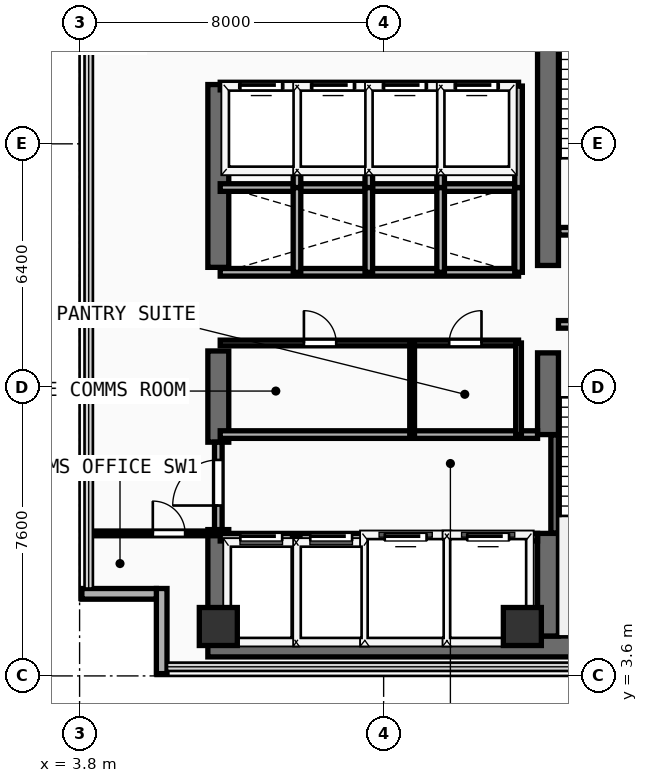
"""IFC4 building model, lengths in metres.
Left out: names, types, materials, properties, quantities, classifications, styles, units other than length and angle.
Written with IfcOpenShell. Run it as: python <this file> out.ifc"""

import sys

from ifc_helpers import new_model, si_unit, direction, frame, frame_2d, origin, origin_2d, place, context, subcontext, project, spatial, rectangle, extrude, element, fill, save


model = new_model("IFC4")
c1 = context("Model", 3, precision=1e-05, world=origin(), true_north=direction((0.0, 1.0)))
c2 = subcontext(c1, "Body", "Model", "MODEL_VIEW")
j1 = project(units=[si_unit("LENGTHUNIT", "METRE"), si_unit("PLANEANGLEUNIT", "RADIAN")], contexts=[c1])
p1 = place(None, origin())
s1 = spatial("IfcSite", under=j1, at=p1, CompositionType="ELEMENT")
p2 = place(p1, origin())
s2 = spatial("IfcBuilding", under=s1, at=p2, CompositionType="ELEMENT")
p3 = place(p2, frame((0.0, 0.0, 227.3)))
s3 = spatial("IfcBuildingStorey", under=s2, at=p3, CompositionType="ELEMENT", Elevation=227.3)
p4 = place(p3, frame((7.175, 4.375, 0.0), z_axis=(0.0, 0.0, 1.0), x_axis=(1.0, 0.0, 0.0)))
e1 = element("IfcWall", 1, at=p4, inside=s3, PredefinedType="SHEAR", context=c2, shape_type="SweptSolid", body=[
    extrude(rectangle(XDim=13.9, YDim=0.55, at=frame_2d((6.95, 0.0))), origin(), (0.0, 0.0, 1.0), 3.56),
])
p5 = place(p3, frame((7.45, 4.65, 0.0), z_axis=(0.0, 0.0, 1.0), x_axis=(0.0, 1.0, 0.0)))
e2 = element("IfcWall", 2, at=p5, inside=s3, PredefinedType="SHEAR", context=c2, shape_type="SweptSolid", body=[
    extrude(rectangle(XDim=2.8, YDim=0.55, at=frame_2d((1.4, 0.0))), origin(), (0.0, 0.0, 1.0), 3.56),
])
p6 = place(p3, frame((7.45, 9.75, 0.0), z_axis=(0.0, 0.0, 1.0), x_axis=(0.0, 1.0, 0.0)))
e3 = element("IfcWall", 3, at=p6, inside=s3, PredefinedType="SHEAR", context=c2, shape_type="SweptSolid", body=[
    extrude(rectangle(XDim=2.4, YDim=0.55, at=frame_2d((1.2, 0.0))), origin(), (0.0, 0.0, 1.0), 3.56),
])
p7 = place(p3, frame((7.45, 14.35, 0.0), z_axis=(0.0, 0.0, 1.0), x_axis=(0.0, 1.0, 0.0)))
e4 = element("IfcWall", 4, at=p7, inside=s3, PredefinedType="SHEAR", context=c2, shape_type="SweptSolid", body=[
    extrude(rectangle(XDim=4.81, YDim=0.55, at=frame_2d((2.405, 0.0))), origin(), (0.0, 0.0, 1.0), 3.56),
])
p8 = place(p3, frame((16.125, 4.65, 0.0), z_axis=(0.0, 0.0, 1.0), x_axis=(0.0, 1.0, 0.0)))
e5 = element("IfcWall", 5, at=p8, inside=s3, PredefinedType="SHEAR", context=c2, shape_type="SweptSolid", body=[
    extrude(rectangle(XDim=2.7, YDim=0.55, at=frame_2d((1.35, 0.0))), origin(), (0.0, 0.0, 1.0), 3.56),
])
p9 = place(p3, frame((16.125, 9.95, 0.0), z_axis=(0.0, 0.0, 1.0), x_axis=(0.0, 1.0, 0.0)))
e6 = element("IfcWall", 6, at=p9, inside=s3, PredefinedType="SHEAR", context=c2, shape_type="SweptSolid", body=[
    extrude(rectangle(XDim=2.15, YDim=0.55, at=frame_2d((1.075, 0.0))), origin(), (0.0, 0.0, 1.0), 3.56),
])
p10 = place(p3, frame((16.125, 14.4, 0.0), z_axis=(0.0, 0.0, 1.0), x_axis=(0.0, 1.0, 0.0)))
e7 = element("IfcWall", 7, at=p10, inside=s3, PredefinedType="SHEAR", context=c2, shape_type="SweptSolid", body=[
    extrude(rectangle(XDim=9.1, YDim=0.55, at=frame_2d((4.55, 0.0))), origin(), (0.0, 0.0, 1.0), 3.56),
])
for number, where, z_axis, x_axis in (
    (8, (7.45, 4.9, 0.0), (0.0, 0.0, 1.0), (1.0, 0.0, 0.0)),
    (9, (15.45, 4.9, 0.0), (0.0, 0.0, 1.0), (1.0, 0.0, 0.0)),
):
    element("IfcColumn", number, at=place(p3, frame(where, z_axis=z_axis, x_axis=x_axis)), inside=s3, PredefinedType="COLUMN", context=c2, shape_type="SweptSolid", body=[
        extrude(rectangle(XDim=1.0, YDim=1.0, at=origin_2d()), origin(), (0.0, 0.0, 1.0), 3.56),
    ])
p11 = place(p3, frame((5.96, 3.66, 0.0), z_axis=(0.0, 0.0, 1.0), x_axis=(0.0, 1.0, 0.0)))
e10 = element("IfcWall", 10, at=p11, inside=s3, PredefinedType="SOLIDWALL", context=c2, shape_type="SweptSolid", body=[
    extrude(rectangle(XDim=2.24, YDim=0.28, at=frame_2d((1.12, 0.0))), origin(), (0.0, 0.0, 1.0), 3.56),
])
p12 = place(p3, frame((3.86, 5.76, 0.0), z_axis=(0.0, 0.0, 1.0), x_axis=(1.0, 0.0, 0.0)))
e11 = element("IfcWall", 11, at=p12, inside=s3, PredefinedType="SOLIDWALL", context=c2, shape_type="SweptSolid", body=[
    extrude(rectangle(XDim=1.96, YDim=0.28, at=frame_2d((0.98, 0.0))), origin(), (0.0, 0.0, 1.0), 3.56),
])
p13 = place(p3, frame((16.3, 7.36, 0.0), z_axis=(0.0, 0.0, 1.0), x_axis=(0.0, 1.0, 0.0)))
e12 = element("IfcWall", 12, at=p13, inside=s3, PredefinedType="SHEAR", context=c2, shape_type="SweptSolid", body=[
    extrude(rectangle(XDim=2.58, YDim=0.2, at=frame_2d((1.29, 0.0))), origin(), (0.0, 0.0, 1.0), 3.56),
])
p14 = place(p3, frame((16.4, 12.85, 0.0), z_axis=(0.0, 0.0, 1.0), x_axis=(1.0, 0.0, 0.0)))
e13 = element("IfcWall", 13, at=p14, inside=s3, PredefinedType="PARTITIONING", context=c2, shape_type="SweptSolid", body=[
    extrude(rectangle(XDim=3.96, YDim=0.2, at=frame_2d((1.98, 0.0))), origin(), (0.0, 0.0, 1.0), 3.56),
])
p15 = place(p14, frame((1.304, 0.0, 0.0)))
e14 = element("IfcOpeningElement", 14, at=p15, cuts=e13, PredefinedType="OPENING", context=c2, shape_type="SweptSolid", body=[
    extrude(rectangle(XDim=1.1, YDim=2.2, at=frame_2d((0.55, 1.1))), frame((0.0, 0.11, 0.0), z_axis=(0.0, -1.0, 0.0), x_axis=(1.0, 0.0, 0.0)), (0.0, 0.0, 1.0), 0.22),
])
p16 = place(p3, frame((16.41, 15.3, 0.0), z_axis=(0.0, 0.0, 1.0), x_axis=(1.0, 0.0, 0.0)))
e15 = element("IfcWall", 15, at=p16, inside=s3, PredefinedType="PARTITIONING", context=c2, shape_type="SweptSolid", body=[
    extrude(rectangle(XDim=3.95, YDim=0.2, at=frame_2d((1.975, 0.0))), origin(), (0.0, 0.0, 1.0), 3.56),
])
p17 = place(p16, frame((1.294, 0.0, 0.0)))
e16 = element("IfcOpeningElement", 16, at=p17, cuts=e15, PredefinedType="OPENING", context=c2, shape_type="SweptSolid", body=[
    extrude(rectangle(XDim=1.1, YDim=2.2, at=frame_2d((0.55, 1.1))), frame((0.0, 0.11, 0.0), z_axis=(0.0, -1.0, 0.0), x_axis=(1.0, 0.0, 0.0)), (0.0, 0.0, 1.0), 0.22),
])
p18 = place(p3, frame((7.5, 7.25, 0.0), z_axis=(0.0, 0.0, 1.0), x_axis=(1.0, 0.0, 0.0)))
e17 = element("IfcWall", 17, at=p18, inside=s3, PredefinedType="PARTITIONING", context=c2, shape_type="SweptSolid", body=[
    extrude(rectangle(XDim=8.35, YDim=0.2, at=frame_2d((4.175, 0.0))), origin(), (0.0, 0.0, 1.0), 3.56),
])
p19 = place(p18, frame((0.53, 0.0, 0.0)))
e18 = element("IfcOpeningElement", 18, at=p19, cuts=e17, PredefinedType="OPENING", context=c2, shape_type="SweptSolid", body=[
    extrude(rectangle(XDim=1.1, YDim=2.2, at=frame_2d((0.55, 1.1))), frame((0.0, 0.11, 0.0), z_axis=(0.0, -1.0, 0.0), x_axis=(1.0, 0.0, 0.0)), (0.0, 0.0, 1.0), 0.22),
])
p20 = place(p18, frame((2.37, 0.0, 0.0)))
e19 = element("IfcOpeningElement", 19, at=p20, cuts=e17, PredefinedType="OPENING", context=c2, shape_type="SweptSolid", body=[
    extrude(rectangle(XDim=1.1, YDim=2.2, at=frame_2d((0.55, 1.1))), frame((0.0, 0.11, 0.0), z_axis=(0.0, -1.0, 0.0), x_axis=(1.0, 0.0, 0.0)), (0.0, 0.0, 1.0), 0.22),
])
p21 = place(p18, frame((4.33, 0.0, 0.0)))
e20 = element("IfcOpeningElement", 20, at=p21, cuts=e17, PredefinedType="OPENING", context=c2, shape_type="SweptSolid", body=[
    extrude(rectangle(XDim=1.1, YDim=2.2, at=frame_2d((0.55, 1.1))), frame((0.0, 0.11, 0.0), z_axis=(0.0, -1.0, 0.0), x_axis=(1.0, 0.0, 0.0)), (0.0, 0.0, 1.0), 0.22),
])
p22 = place(p18, frame((6.5, 0.0, 0.0)))
e21 = element("IfcOpeningElement", 21, at=p22, cuts=e17, PredefinedType="OPENING", context=c2, shape_type="SweptSolid", body=[
    extrude(rectangle(XDim=1.1, YDim=2.2, at=frame_2d((0.55, 1.1))), frame((0.0, 0.11, 0.0), z_axis=(0.0, -1.0, 0.0), x_axis=(1.0, 0.0, 0.0)), (0.0, 0.0, 1.0), 0.22),
])
p23 = place(p3, frame((7.5, 9.95, 0.0), z_axis=(0.0, 0.0, 1.0), x_axis=(1.0, 0.0, 0.0)))
e22 = element("IfcWall", 22, at=p23, inside=s3, PredefinedType="PARTITIONING", context=c2, shape_type="SweptSolid", body=[
    extrude(rectangle(XDim=8.35, YDim=0.2, at=frame_2d((4.175, 0.0))), origin(), (0.0, 0.0, 1.0), 3.56),
])
for number, where, z_axis, x_axis in (
    (23, (9.5, 4.45, 0.0), (0.0, 0.0, 1.0), (0.0, 1.0, 0.0)),
    (24, (11.36, 4.45, 0.0), (0.0, 0.0, 1.0), (0.0, 1.0, 0.0)),
    (25, (13.46, 4.45, 0.0), (0.0, 0.0, 1.0), (0.0, 1.0, 0.0)),
):
    element("IfcWall", number, at=place(p3, frame(where, z_axis=z_axis, x_axis=x_axis)), inside=s3, PredefinedType="PARTITIONING", context=c2, shape_type="SweptSolid", body=[
        extrude(rectangle(XDim=2.8, YDim=0.2, at=frame_2d((1.4, 0.0))), origin(), (0.0, 0.0, 1.0), 3.56),
    ])
p24 = place(p3, frame((7.45, 7.45, 0.0), z_axis=(0.0, 0.0, 1.0), x_axis=(0.0, 1.0, 0.0)))
e26 = element("IfcWall", 26, at=p24, inside=s3, PredefinedType="PARTITIONING", context=c2, shape_type="SweptSolid", body=[
    extrude(rectangle(XDim=2.3, YDim=0.2, at=frame_2d((1.15, 0.0))), origin(), (0.0, 0.0, 1.0), 2.54),
])
p25 = place(p24, frame((0.633, 0.0, 0.0)))
e27 = element("IfcOpeningElement", 27, at=p25, cuts=e26, PredefinedType="OPENING", context=c2, shape_type="SweptSolid", body=[
    extrude(rectangle(XDim=1.2, YDim=2.25, at=frame_2d((0.6, 1.125))), frame((0.0, 0.11, 0.0), z_axis=(0.0, -1.0, 0.0), x_axis=(1.0, 0.0, 0.0)), (0.0, 0.0, 1.0), 0.22),
])
p26 = place(p3, frame((7.5, 12.36, 0.0), z_axis=(0.0, 0.0, 1.0), x_axis=(1.0, 0.0, 0.0)))
e28 = element("IfcWall", 28, at=p26, inside=s3, PredefinedType="PARTITIONING", context=c2, shape_type="SweptSolid", body=[
    extrude(rectangle(XDim=7.85, YDim=0.15, at=frame_2d((3.925, 0.0))), origin(), (0.0, 0.0, 1.0), 3.56),
])
p27 = place(p26, frame((2.202, 0.0, 0.0)))
e29 = element("IfcOpeningElement", 29, at=p27, cuts=e28, PredefinedType="OPENING", context=c2, shape_type="SweptSolid", body=[
    extrude(rectangle(XDim=0.85, YDim=2.15, at=frame_2d((0.425, 1.075))), frame((0.0, 0.085, 0.0), z_axis=(0.0, -1.0, 0.0), x_axis=(1.0, 0.0, 0.0)), (0.0, 0.0, 1.0), 0.17),
])
p28 = place(p26, frame((6.025, 0.0, 0.0)))
e30 = element("IfcOpeningElement", 30, at=p28, cuts=e28, PredefinedType="OPENING", context=c2, shape_type="SweptSolid", body=[
    extrude(rectangle(XDim=0.85, YDim=2.15, at=frame_2d((0.425, 1.075))), frame((0.0, 0.085, 0.0), z_axis=(0.0, -1.0, 0.0), x_axis=(1.0, 0.0, 0.0)), (0.0, 0.0, 1.0), 0.17),
])
p29 = place(p3, frame((15.35, 9.95, 0.0), z_axis=(0.0, 0.0, 1.0), x_axis=(0.0, 1.0, 0.0)))
e31 = element("IfcWall", 31, at=p29, inside=s3, PredefinedType="PARTITIONING", context=c2, shape_type="SweptSolid", body=[
    extrude(rectangle(XDim=2.41, YDim=0.15, at=frame_2d((1.205, 0.0))), origin(), (0.0, 0.0, 1.0), 3.56),
])
p30 = place(p3, frame((12.55, 9.95, 0.0), z_axis=(0.0, 0.0, 1.0), x_axis=(0.0, 1.0, 0.0)))
e32 = element("IfcWall", 32, at=p30, inside=s3, PredefinedType="PARTITIONING", context=c2, shape_type="SweptSolid", body=[
    extrude(rectangle(XDim=2.41, YDim=0.125, at=frame_2d((1.205, 0.0))), origin(), (0.0, 0.0, 1.0), 3.56),
])
for number, where, z_axis, x_axis in (
    (33, (7.5, 14.22, 0.0), (0.0, 0.0, 1.0), (1.0, 0.0, 0.0)),
    (34, (7.5, 16.45, 0.0), (0.0, 0.0, 1.0), (1.0, 0.0, 0.0)),
):
    element("IfcWall", number, at=place(p3, frame(where, z_axis=z_axis, x_axis=x_axis)), inside=s3, PredefinedType="PARTITIONING", context=c2, shape_type="SweptSolid", body=[
        extrude(rectangle(XDim=7.85, YDim=0.2, at=frame_2d((3.925, 0.0))), origin(), (0.0, 0.0, 1.0), 3.56),
    ])
for number, where, z_axis, x_axis in (
    (35, (15.35, 14.22, 0.0), (0.0, 0.0, 1.0), (0.0, 1.0, 0.0)),
    (36, (9.52, 14.22, 0.0), (0.0, 0.0, 1.0), (0.0, 1.0, 0.0)),
    (37, (11.41, 14.22, 0.0), (0.0, 0.0, 1.0), (0.0, 1.0, 0.0)),
    (38, (13.3, 14.22, 0.0), (0.0, 0.0, 1.0), (0.0, 1.0, 0.0)),
):
    element("IfcWall", number, at=place(p3, frame(where, z_axis=z_axis, x_axis=x_axis)), inside=s3, PredefinedType="PARTITIONING", context=c2, shape_type="SweptSolid", body=[
        extrude(rectangle(XDim=2.23, YDim=0.2, at=frame_2d((1.115, 0.0))), origin(), (0.0, 0.0, 1.0), 3.56),
    ])
p31 = place(p3, frame((7.5, 19.12, 0.0), z_axis=(0.0, 0.0, 1.0), x_axis=(1.0, 0.0, 0.0)))
e39 = element("IfcWall", 39, at=p31, inside=s3, PredefinedType="PARTITIONING", context=c2, shape_type="SweptSolid", body=[
    extrude(rectangle(XDim=7.85, YDim=0.2, at=frame_2d((3.925, 0.0))), origin(), (0.0, 0.0, 1.0), 3.56),
])
p32 = place(p31, frame((0.53, 0.0, 0.0)))
e40 = element("IfcOpeningElement", 40, at=p32, cuts=e39, PredefinedType="OPENING", context=c2, shape_type="SweptSolid", body=[
    extrude(rectangle(XDim=1.1, YDim=2.2, at=frame_2d((0.55, 1.1))), frame((0.0, 0.11, 0.0), z_axis=(0.0, -1.0, 0.0), x_axis=(1.0, 0.0, 0.0)), (0.0, 0.0, 1.0), 0.22),
])
p33 = place(p31, frame((2.42, 0.0, 0.0)))
e41 = element("IfcOpeningElement", 41, at=p33, cuts=e39, PredefinedType="OPENING", context=c2, shape_type="SweptSolid", body=[
    extrude(rectangle(XDim=1.1, YDim=2.2, at=frame_2d((0.55, 1.1))), frame((0.0, 0.11, 0.0), z_axis=(0.0, -1.0, 0.0), x_axis=(1.0, 0.0, 0.0)), (0.0, 0.0, 1.0), 0.22),
])
p34 = place(p31, frame((4.31, 0.0, 0.0)))
e42 = element("IfcOpeningElement", 42, at=p34, cuts=e39, PredefinedType="OPENING", context=c2, shape_type="SweptSolid", body=[
    extrude(rectangle(XDim=1.1, YDim=2.2, at=frame_2d((0.55, 1.1))), frame((0.0, 0.11, 0.0), z_axis=(0.0, -1.0, 0.0), x_axis=(1.0, 0.0, 0.0)), (0.0, 0.0, 1.0), 0.22),
])
p35 = place(p31, frame((6.2, 0.0, 0.0)))
e43 = element("IfcOpeningElement", 43, at=p35, cuts=e39, PredefinedType="OPENING", context=c2, shape_type="SweptSolid", body=[
    extrude(rectangle(XDim=1.1, YDim=2.2, at=frame_2d((0.55, 1.1))), frame((0.0, 0.11, 0.0), z_axis=(0.0, -1.0, 0.0), x_axis=(1.0, 0.0, 0.0)), (0.0, 0.0, 1.0), 0.22),
])
for number, where, z_axis, x_axis in (
    (44, (15.35, 16.45, 0.0), (0.0, 0.0, 1.0), (0.0, 1.0, 0.0)),
    (45, (9.52, 16.45, 0.0), (0.0, 0.0, 1.0), (0.0, 1.0, 0.0)),
    (46, (11.41, 16.45, 0.0), (0.0, 0.0, 1.0), (0.0, 1.0, 0.0)),
    (47, (13.3, 16.45, 0.0), (0.0, 0.0, 1.0), (0.0, 1.0, 0.0)),
):
    element("IfcWall", number, at=place(p3, frame(where, z_axis=z_axis, x_axis=x_axis)), inside=s3, PredefinedType="PARTITIONING", context=c2, shape_type="SweptSolid", body=[
        extrude(rectangle(XDim=2.67, YDim=0.2, at=frame_2d((1.335, 0.0))), origin(), (0.0, 0.0, 1.0), 3.56),
    ])
p36 = place(p3, frame((4.04, 7.35, 0.0), z_axis=(0.0, 0.0, 1.0), x_axis=(1.0, 0.0, 0.0)))
e48 = element("IfcWall", 48, at=p36, inside=s3, PredefinedType="PARTITIONING", context=c2, shape_type="SweptSolid", body=[
    extrude(rectangle(XDim=3.36, YDim=0.125, at=frame_2d((1.68, 0.0))), origin(), (0.0, 0.0, 1.0), 3.56),
])
p37 = place(p36, frame((1.687, 0.0, 0.0)))
e49 = element("IfcOpeningElement", 49, at=p37, cuts=e48, PredefinedType="OPENING", context=c2, shape_type="SweptSolid", body=[
    extrude(rectangle(XDim=0.85, YDim=2.15, at=frame_2d((0.425, 1.075))), frame((0.0, 0.073, 0.0), z_axis=(0.0, -1.0, 0.0), x_axis=(1.0, 0.0, 0.0)), (0.0, 0.0, 1.0), 0.145),
])
p38 = place(p19, origin())
e50 = element("IfcDoor", 50, at=p38, inside=s3, OperationType="SLIDING_TO_LEFT", PredefinedType="DOOR", context=c2, shape_type="SweptSolid", body=[
    extrude(rectangle(XDim=1.1, YDim=2.2, at=frame_2d((0.55, 1.1))), frame((0.0, 0.025, 0.0), z_axis=(0.0, -1.0, 0.0), x_axis=(1.0, 0.0, 0.0)), (0.0, 0.0, 1.0), 0.05),
])
fill(e18, e50)
p39 = place(p20, origin())
e51 = element("IfcDoor", 51, at=p39, inside=s3, OperationType="SLIDING_TO_LEFT", PredefinedType="DOOR", context=c2, shape_type="SweptSolid", body=[
    extrude(rectangle(XDim=1.1, YDim=2.2, at=frame_2d((0.55, 1.1))), frame((0.0, 0.025, 0.0), z_axis=(0.0, -1.0, 0.0), x_axis=(1.0, 0.0, 0.0)), (0.0, 0.0, 1.0), 0.05),
])
fill(e19, e51)
p40 = place(p21, origin())
e52 = element("IfcDoor", 52, at=p40, inside=s3, OperationType="SLIDING_TO_LEFT", PredefinedType="DOOR", context=c2, shape_type="SweptSolid", body=[
    extrude(rectangle(XDim=1.1, YDim=2.2, at=frame_2d((0.55, 1.1))), frame((0.0, 0.025, 0.0), z_axis=(0.0, -1.0, 0.0), x_axis=(1.0, 0.0, 0.0)), (0.0, 0.0, 1.0), 0.05),
])
fill(e20, e52)
p41 = place(p22, origin())
e53 = element("IfcDoor", 53, at=p41, inside=s3, OperationType="SLIDING_TO_LEFT", PredefinedType="DOOR", context=c2, shape_type="SweptSolid", body=[
    extrude(rectangle(XDim=1.1, YDim=2.2, at=frame_2d((0.55, 1.1))), frame((0.0, 0.025, 0.0), z_axis=(0.0, -1.0, 0.0), x_axis=(1.0, 0.0, 0.0)), (0.0, 0.0, 1.0), 0.05),
])
fill(e21, e53)
p42 = place(p25, frame((1.2, 0.0, 0.0), z_axis=(0.0, 0.0, 1.0), x_axis=(-1.0, 0.0, 0.0)))
e54 = element("IfcDoor", 54, at=p42, inside=s3, OperationType="SINGLE_SWING_RIGHT", PredefinedType="DOOR", context=c2, shape_type="SweptSolid", body=[
    extrude(rectangle(XDim=1.2, YDim=2.25, at=frame_2d((0.6, 1.125))), frame((0.0, 0.025, 0.0), z_axis=(0.0, -1.0, 0.0), x_axis=(1.0, 0.0, 0.0)), (0.0, 0.0, 1.0), 0.05),
])
fill(e27, e54)
p43 = place(p27, origin())
e55 = element("IfcDoor", 55, at=p43, inside=s3, OperationType="SINGLE_SWING_LEFT", PredefinedType="DOOR", context=c2, shape_type="SweptSolid", body=[
    extrude(rectangle(XDim=0.85, YDim=2.15, at=frame_2d((0.425, 1.075))), frame((0.0, 0.025, 0.0), z_axis=(0.0, -1.0, 0.0), x_axis=(1.0, 0.0, 0.0)), (0.0, 0.0, 1.0), 0.05),
])
fill(e29, e55)
p44 = place(p28, origin())
e56 = element("IfcDoor", 56, at=p44, inside=s3, OperationType="SINGLE_SWING_RIGHT", PredefinedType="DOOR", context=c2, shape_type="SweptSolid", body=[
    extrude(rectangle(XDim=0.85, YDim=2.15, at=frame_2d((0.425, 1.075))), frame((0.0, 0.025, 0.0), z_axis=(0.0, -1.0, 0.0), x_axis=(1.0, 0.0, 0.0)), (0.0, 0.0, 1.0), 0.05),
])
fill(e30, e56)
p45 = place(p32, origin())
e57 = element("IfcDoor", 57, at=p45, inside=s3, OperationType="SLIDING_TO_LEFT", PredefinedType="DOOR", context=c2, shape_type="SweptSolid", body=[
    extrude(rectangle(XDim=1.1, YDim=2.2, at=frame_2d((0.55, 1.1))), frame((0.0, 0.025, 0.0), z_axis=(0.0, -1.0, 0.0), x_axis=(1.0, 0.0, 0.0)), (0.0, 0.0, 1.0), 0.05),
])
fill(e40, e57)
p46 = place(p33, origin())
e58 = element("IfcDoor", 58, at=p46, inside=s3, OperationType="SLIDING_TO_LEFT", PredefinedType="DOOR", context=c2, shape_type="SweptSolid", body=[
    extrude(rectangle(XDim=1.1, YDim=2.2, at=frame_2d((0.55, 1.1))), frame((0.0, 0.025, 0.0), z_axis=(0.0, -1.0, 0.0), x_axis=(1.0, 0.0, 0.0)), (0.0, 0.0, 1.0), 0.05),
])
fill(e41, e58)
p47 = place(p34, origin())
e59 = element("IfcDoor", 59, at=p47, inside=s3, OperationType="SLIDING_TO_LEFT", PredefinedType="DOOR", context=c2, shape_type="SweptSolid", body=[
    extrude(rectangle(XDim=1.1, YDim=2.2, at=frame_2d((0.55, 1.1))), frame((0.0, 0.025, 0.0), z_axis=(0.0, -1.0, 0.0), x_axis=(1.0, 0.0, 0.0)), (0.0, 0.0, 1.0), 0.05),
])
fill(e42, e59)
p48 = place(p35, origin())
e60 = element("IfcDoor", 60, at=p48, inside=s3, OperationType="SLIDING_TO_LEFT", PredefinedType="DOOR", context=c2, shape_type="SweptSolid", body=[
    extrude(rectangle(XDim=1.1, YDim=2.2, at=frame_2d((0.55, 1.1))), frame((0.0, 0.025, 0.0), z_axis=(0.0, -1.0, 0.0), x_axis=(1.0, 0.0, 0.0)), (0.0, 0.0, 1.0), 0.05),
])
fill(e43, e60)
p49 = place(p37, origin())
e61 = element("IfcDoor", 61, at=p49, inside=s3, OperationType="SINGLE_SWING_LEFT", PredefinedType="DOOR", context=c2, shape_type="SweptSolid", body=[
    extrude(rectangle(XDim=0.85, YDim=2.15, at=frame_2d((0.425, 1.075))), frame((0.0, 0.025, 0.0), z_axis=(0.0, -1.0, 0.0), x_axis=(1.0, 0.0, 0.0)), (0.0, 0.0, 1.0), 0.05),
])
fill(e49, e61)
save(model, sys.argv[1])
